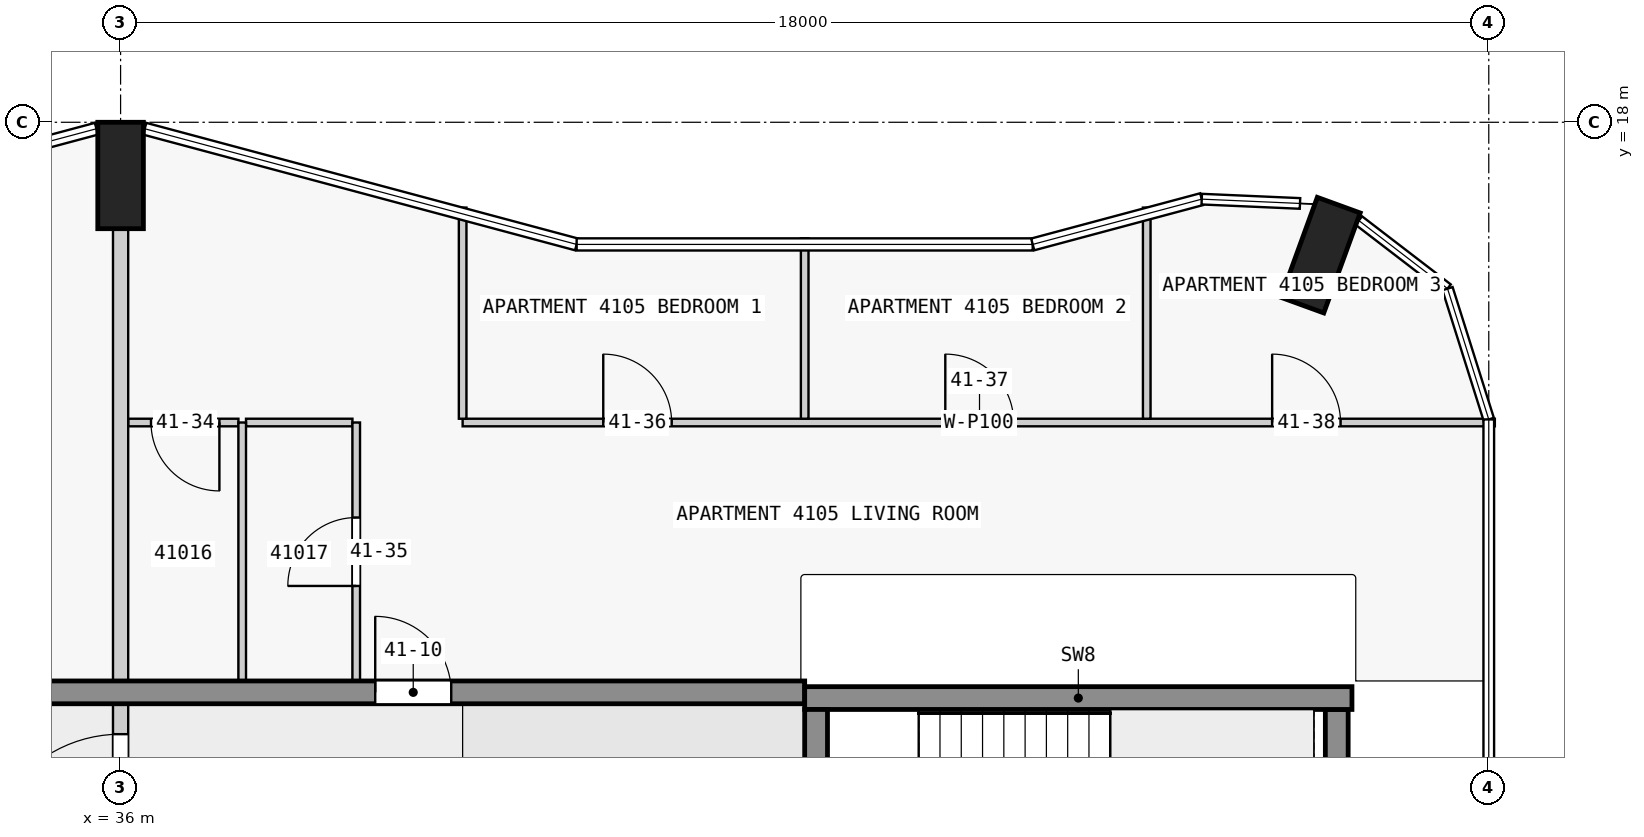
"""IFC4 building model, lengths in metres.
Left out: names, types, materials, properties, quantities, classifications, styles, units other than length and angle.
Written with IfcOpenShell. Run it as: python <this file> out.ifc"""

import sys

from ifc_helpers import new_model, si_unit, direction, frame, frame_2d, origin, origin_2d, place, context, subcontext, project, spatial, rectangle, extrude, element, fill, save


model = new_model("IFC4")
c1 = context("Model", 3, precision=1e-05, world=origin(), true_north=direction((0.0, 1.0)))
c2 = subcontext(c1, "Body", "Model", "MODEL_VIEW")
j1 = project(units=[si_unit("LENGTHUNIT", "METRE"), si_unit("PLANEANGLEUNIT", "RADIAN")], contexts=[c1])
p1 = place(None, origin())
s1 = spatial("IfcSite", under=j1, at=p1, CompositionType="ELEMENT")
p2 = place(p1, origin())
s2 = spatial("IfcBuilding", under=s1, at=p2, CompositionType="ELEMENT")
p3 = place(p2, frame((0.0, 0.0, 160.4)))
s3 = spatial("IfcBuildingStorey", under=s2, at=p3, CompositionType="ELEMENT", Elevation=160.4)
for number, where, z_axis, x_axis in (
    (1, (51.787, 16.252, 0.0), (0.0, 0.0, 1.0), (-0.94, 0.342, 0.0)),
    (2, (36.0, 17.3, 0.0), (0.0, 0.0, 1.0), (1.0, 0.0, 0.0)),
):
    element("IfcColumn", number, at=place(p3, frame(where, z_axis=z_axis, x_axis=x_axis)), inside=s3, PredefinedType="COLUMN", context=c2, shape_type="SweptSolid", body=[
        extrude(rectangle(XDim=0.6, YDim=1.4, at=origin_2d()), origin(), (0.0, 0.0, 1.0), 3.5),
    ])
p4 = place(p3, frame((45.15, 7.725, 0.0), z_axis=(0.0, 0.0, 1.0), x_axis=(0.0, 1.0, 0.0)))
e3 = element("IfcWall", 3, at=p4, inside=s3, PredefinedType="SHEAR", context=c2, shape_type="SweptSolid", body=[
    extrude(rectangle(XDim=2.55, YDim=0.3, at=frame_2d((1.275, 0.0))), origin(), (0.0, 0.0, 1.0), 3.5),
])
p5 = place(p4, frame((0.725, 0.0, 0.0)))
e4 = element("IfcOpeningElement", 4, at=p5, cuts=e3, PredefinedType="OPENING", context=c2, shape_type="SweptSolid", body=[
    extrude(rectangle(XDim=1.1, YDim=2.1, at=frame_2d((0.55, 1.05))), frame((0.0, 0.16, 0.0), z_axis=(0.0, -1.0, 0.0), x_axis=(1.0, 0.0, 0.0)), (0.0, 0.0, 1.0), 0.32),
])
p6 = place(p3, frame((52.0, 7.725, 0.0), z_axis=(0.0, 0.0, 1.0), x_axis=(0.0, 1.0, 0.0)))
e5 = element("IfcWall", 5, at=p6, inside=s3, PredefinedType="SHEAR", context=c2, shape_type="SweptSolid", body=[
    extrude(rectangle(XDim=2.55, YDim=0.3, at=frame_2d((1.275, 0.0))), origin(), (0.0, 0.0, 1.0), 3.5),
])
p7 = place(p3, frame((45.0, 10.425, 0.0), z_axis=(0.0, 0.0, 1.0), x_axis=(1.0, 0.0, 0.0)))
e6 = element("IfcWall", 6, at=p7, inside=s3, PredefinedType="SHEAR", context=c2, shape_type="SweptSolid", body=[
    extrude(rectangle(XDim=7.2, YDim=0.3, at=frame_2d((3.6, 0.0))), origin(), (0.0, 0.0, 1.0), 3.5),
])
p8 = place(p3, frame((22.5, 10.5, 0.0), z_axis=(0.0, 0.0, 1.0), x_axis=(1.0, 0.0, 0.0)))
e7 = element("IfcWall", 7, at=p8, inside=s3, PredefinedType="SHEAR", context=c2, shape_type="SweptSolid", body=[
    extrude(rectangle(XDim=22.5, YDim=0.3, at=frame_2d((11.25, 0.0))), origin(), (0.0, 0.0, 1.0), 3.25),
])
p9 = place(p8, frame((1.75, 0.0, 0.0)))
e8 = element("IfcOpeningElement", 8, at=p9, cuts=e7, PredefinedType="OPENING", context=c2, shape_type="SweptSolid", body=[
    extrude(rectangle(XDim=1.0, YDim=2.1, at=frame_2d((0.5, 1.05))), frame((0.0, 0.16, 0.0), z_axis=(0.0, -1.0, 0.0), x_axis=(1.0, 0.0, 0.0)), (0.0, 0.0, 1.0), 0.32),
])
p10 = place(p8, frame((6.25, 0.0, 0.0)))
e9 = element("IfcOpeningElement", 9, at=p10, cuts=e7, PredefinedType="OPENING", context=c2, shape_type="SweptSolid", body=[
    extrude(rectangle(XDim=1.0, YDim=2.1, at=frame_2d((0.5, 1.05))), frame((0.0, 0.16, 0.0), z_axis=(0.0, -1.0, 0.0), x_axis=(1.0, 0.0, 0.0)), (0.0, 0.0, 1.0), 0.32),
])
p11 = place(p8, frame((10.35, 0.0, 0.0)))
e10 = element("IfcOpeningElement", 10, at=p11, cuts=e7, PredefinedType="OPENING", context=c2, shape_type="SweptSolid", body=[
    extrude(rectangle(XDim=1.8, YDim=2.1, at=frame_2d((0.9, 1.05))), frame((0.0, 0.16, 0.0), z_axis=(0.0, -1.0, 0.0), x_axis=(1.0, 0.0, 0.0)), (0.0, 0.0, 1.0), 0.32),
])
p12 = place(p8, frame((16.85, 0.0, 0.0)))
e11 = element("IfcOpeningElement", 11, at=p12, cuts=e7, PredefinedType="OPENING", context=c2, shape_type="SweptSolid", body=[
    extrude(rectangle(XDim=1.0, YDim=2.1, at=frame_2d((0.5, 1.05))), frame((0.0, 0.16, 0.0), z_axis=(0.0, -1.0, 0.0), x_axis=(1.0, 0.0, 0.0)), (0.0, 0.0, 1.0), 0.32),
])
p13 = place(p3, frame((37.55, 14.05, 0.0), z_axis=(0.0, 0.0, 1.0), x_axis=(-1.0, 0.0, 0.0)))
e12 = element("IfcWall", 12, at=p13, inside=s3, PredefinedType="PARTITIONING", context=c2, shape_type="SweptSolid", body=[
    extrude(rectangle(XDim=1.45, YDim=0.1, at=frame_2d((0.725, 0.0))), origin(), (0.0, 0.0, 1.0), 3.25),
])
p14 = place(p13, frame((0.25, 0.0, 0.0)))
e13 = element("IfcOpeningElement", 13, at=p14, cuts=e12, PredefinedType="OPENING", context=c2, shape_type="SweptSolid", body=[
    extrude(rectangle(XDim=0.9, YDim=2.1, at=frame_2d((0.45, 1.05))), frame((0.0, 0.06, 0.0), z_axis=(0.0, -1.0, 0.0), x_axis=(1.0, 0.0, 0.0)), (0.0, 0.0, 1.0), 0.12),
])
p15 = place(p3, frame((39.05, 14.05, 0.0), z_axis=(0.0, 0.0, 1.0), x_axis=(-1.0, 0.0, 0.0)))
e14 = element("IfcWall", 14, at=p15, inside=s3, PredefinedType="PARTITIONING", context=c2, shape_type="SweptSolid", body=[
    extrude(rectangle(XDim=1.4, YDim=0.1, at=frame_2d((0.7, 0.0))), origin(), (0.0, 0.0, 1.0), 3.25),
])
p16 = place(p3, frame((40.5, 14.05, 0.0), z_axis=(0.0, 0.0, 1.0), x_axis=(1.0, 0.0, 0.0)))
e15 = element("IfcWall", 15, at=p16, inside=s3, PredefinedType="PARTITIONING", context=c2, shape_type="SweptSolid", body=[
    extrude(rectangle(XDim=13.58, YDim=0.1, at=frame_2d((6.79, 0.0))), origin(), (0.0, 0.0, 1.0), 3.25),
])
p17 = place(p16, frame((1.85, 0.0, 0.0)))
e16 = element("IfcOpeningElement", 16, at=p17, cuts=e15, PredefinedType="OPENING", context=c2, shape_type="SweptSolid", body=[
    extrude(rectangle(XDim=0.9, YDim=2.1, at=frame_2d((0.45, 1.05))), frame((0.0, 0.06, 0.0), z_axis=(0.0, -1.0, 0.0), x_axis=(1.0, 0.0, 0.0)), (0.0, 0.0, 1.0), 0.12),
])
p18 = place(p16, frame((6.35, 0.0, 0.0)))
e17 = element("IfcOpeningElement", 17, at=p18, cuts=e15, PredefinedType="OPENING", context=c2, shape_type="SweptSolid", body=[
    extrude(rectangle(XDim=0.9, YDim=2.1, at=frame_2d((0.45, 1.05))), frame((0.0, 0.06, 0.0), z_axis=(0.0, -1.0, 0.0), x_axis=(1.0, 0.0, 0.0)), (0.0, 0.0, 1.0), 0.12),
])
p19 = place(p16, frame((10.65, 0.0, 0.0)))
e18 = element("IfcOpeningElement", 18, at=p19, cuts=e15, PredefinedType="OPENING", context=c2, shape_type="SweptSolid", body=[
    extrude(rectangle(XDim=0.9, YDim=2.1, at=frame_2d((0.45, 1.05))), frame((0.0, 0.06, 0.0), z_axis=(0.0, -1.0, 0.0), x_axis=(1.0, 0.0, 0.0)), (0.0, 0.0, 1.0), 0.12),
])
p20 = place(p3, frame((36.0, 10.65, 0.0), z_axis=(0.0, 0.0, 1.0), x_axis=(0.0, 1.0, 0.0)))
e19 = element("IfcWall", 19, at=p20, inside=s3, PredefinedType="PARTITIONING", context=c2, shape_type="SweptSolid", body=[
    extrude(rectangle(XDim=5.95, YDim=0.2, at=frame_2d((2.975, 0.0))), origin(), (0.0, 0.0, 1.0), 3.25),
])
p21 = place(p3, frame((37.6, 10.65, 0.0), z_axis=(0.0, 0.0, 1.0), x_axis=(0.0, 1.0, 0.0)))
e20 = element("IfcWall", 20, at=p21, inside=s3, PredefinedType="PARTITIONING", context=c2, shape_type="SweptSolid", body=[
    extrude(rectangle(XDim=3.4, YDim=0.1, at=frame_2d((1.7, 0.0))), origin(), (0.0, 0.0, 1.0), 3.25),
])
p22 = place(p3, frame((39.1, 10.65, 0.0), z_axis=(0.0, 0.0, 1.0), x_axis=(0.0, 1.0, 0.0)))
e21 = element("IfcWall", 21, at=p22, inside=s3, PredefinedType="PARTITIONING", context=c2, shape_type="SweptSolid", body=[
    extrude(rectangle(XDim=3.4, YDim=0.1, at=frame_2d((1.7, 0.0))), origin(), (0.0, 0.0, 1.0), 3.25),
])
p23 = place(p22, frame((1.25, 0.0, 0.0)))
e22 = element("IfcOpeningElement", 22, at=p23, cuts=e21, PredefinedType="OPENING", context=c2, shape_type="SweptSolid", body=[
    extrude(rectangle(XDim=0.9, YDim=2.1, at=frame_2d((0.45, 1.05))), frame((0.0, 0.06, 0.0), z_axis=(0.0, -1.0, 0.0), x_axis=(1.0, 0.0, 0.0)), (0.0, 0.0, 1.0), 0.12),
])
p24 = place(p3, frame((40.5, 16.878, 0.0), z_axis=(0.0, 0.0, 1.0), x_axis=(0.0, -1.0, 0.0)))
e23 = element("IfcWall", 23, at=p24, inside=s3, PredefinedType="PARTITIONING", context=c2, shape_type="SweptSolid", body=[
    extrude(rectangle(XDim=2.778, YDim=0.1, at=frame_2d((1.389, 0.0))), origin(), (0.0, 0.0, 1.0), 3.25),
])
p25 = place(p3, frame((45.0, 14.1, 0.0), z_axis=(0.0, 0.0, 1.0), x_axis=(0.0, 1.0, 0.0)))
e24 = element("IfcWall", 24, at=p25, inside=s3, PredefinedType="PARTITIONING", context=c2, shape_type="SweptSolid", body=[
    extrude(rectangle(XDim=2.373, YDim=0.1, at=frame_2d((1.187, 0.0))), origin(), (0.0, 0.0, 1.0), 3.25),
])
p26 = place(p3, frame((49.5, 14.1, 0.0), z_axis=(0.0, 0.0, 1.0), x_axis=(0.0, 1.0, 0.0)))
e25 = element("IfcWall", 25, at=p26, inside=s3, PredefinedType="PARTITIONING", context=c2, shape_type="SweptSolid", body=[
    extrude(rectangle(XDim=2.778, YDim=0.1, at=frame_2d((1.389, 0.0))), origin(), (0.0, 0.0, 1.0), 3.25),
])
p27 = place(p3, frame((36.0, 7.45, 0.0), z_axis=(0.0, 0.0, 1.0), x_axis=(0.0, 1.0, 0.0)))
e26 = element("IfcWall", 26, at=p27, inside=s3, PredefinedType="PARTITIONING", context=c2, shape_type="SweptSolid", body=[
    extrude(rectangle(XDim=3.1, YDim=0.2, at=frame_2d((1.55, 0.0))), origin(), (0.0, 0.0, 1.0), 3.25),
])
p28 = place(p27, frame((0.7, 0.0, 0.0)))
e27 = element("IfcOpeningElement", 27, at=p28, cuts=e26, PredefinedType="OPENING", context=c2, shape_type="SweptSolid", body=[
    extrude(rectangle(XDim=1.8, YDim=2.1, at=frame_2d((0.9, 1.05))), frame((0.0, 0.11, 0.0), z_axis=(0.0, -1.0, 0.0), x_axis=(1.0, 0.0, 0.0)), (0.0, 0.0, 1.0), 0.22),
])
p29 = place(p12, origin())
e28 = element("IfcDoor", 28, at=p29, inside=s3, OperationType="SINGLE_SWING_RIGHT", PredefinedType="DOOR", context=c2, shape_type="SweptSolid", body=[
    extrude(rectangle(XDim=1.0, YDim=2.1, at=frame_2d((0.5, 1.05))), frame((0.0, 0.025, 0.0), z_axis=(0.0, -1.0, 0.0), x_axis=(1.0, 0.0, 0.0)), (0.0, 0.0, 1.0), 0.05),
])
fill(e11, e28)
p30 = place(p28, origin())
e29 = element("IfcDoor", 29, at=p30, inside=s3, OperationType="SINGLE_SWING_RIGHT", PredefinedType="DOOR", context=c2, shape_type="SweptSolid", body=[
    extrude(rectangle(XDim=1.8, YDim=2.1, at=frame_2d((0.9, 1.05))), frame((0.0, 0.025, 0.0), z_axis=(0.0, -1.0, 0.0), x_axis=(1.0, 0.0, 0.0)), (0.0, 0.0, 1.0), 0.05),
])
fill(e27, e29)
p31 = place(p14, origin())
e30 = element("IfcDoor", 30, at=p31, inside=s3, OperationType="SINGLE_SWING_LEFT", PredefinedType="DOOR", context=c2, shape_type="SweptSolid", body=[
    extrude(rectangle(XDim=0.9, YDim=2.1, at=frame_2d((0.45, 1.05))), frame((0.0, 0.025, 0.0), z_axis=(0.0, -1.0, 0.0), x_axis=(1.0, 0.0, 0.0)), (0.0, 0.0, 1.0), 0.05),
])
fill(e13, e30)
p32 = place(p23, origin())
e31 = element("IfcDoor", 31, at=p32, inside=s3, OperationType="SINGLE_SWING_LEFT", PredefinedType="DOOR", context=c2, shape_type="SweptSolid", body=[
    extrude(rectangle(XDim=0.9, YDim=2.1, at=frame_2d((0.45, 1.05))), frame((0.0, 0.025, 0.0), z_axis=(0.0, -1.0, 0.0), x_axis=(1.0, 0.0, 0.0)), (0.0, 0.0, 1.0), 0.05),
])
fill(e22, e31)
p33 = place(p17, origin())
e32 = element("IfcDoor", 32, at=p33, inside=s3, OperationType="SINGLE_SWING_LEFT", PredefinedType="DOOR", context=c2, shape_type="SweptSolid", body=[
    extrude(rectangle(XDim=0.9, YDim=2.1, at=frame_2d((0.45, 1.05))), frame((0.0, 0.025, 0.0), z_axis=(0.0, -1.0, 0.0), x_axis=(1.0, 0.0, 0.0)), (0.0, 0.0, 1.0), 0.05),
])
fill(e16, e32)
p34 = place(p18, origin())
e33 = element("IfcDoor", 33, at=p34, inside=s3, OperationType="SINGLE_SWING_RIGHT", PredefinedType="DOOR", context=c2, shape_type="SweptSolid", body=[
    extrude(rectangle(XDim=0.9, YDim=2.1, at=frame_2d((0.45, 1.05))), frame((0.0, 0.025, 0.0), z_axis=(0.0, -1.0, 0.0), x_axis=(1.0, 0.0, 0.0)), (0.0, 0.0, 1.0), 0.05),
])
fill(e17, e33)
p35 = place(p19, origin())
e34 = element("IfcDoor", 34, at=p35, inside=s3, OperationType="SINGLE_SWING_RIGHT", PredefinedType="DOOR", context=c2, shape_type="SweptSolid", body=[
    extrude(rectangle(XDim=0.9, YDim=2.1, at=frame_2d((0.45, 1.05))), frame((0.0, 0.025, 0.0), z_axis=(0.0, -1.0, 0.0), x_axis=(1.0, 0.0, 0.0)), (0.0, 0.0, 1.0), 0.05),
])
fill(e18, e34)
save(model, sys.argv[1])
